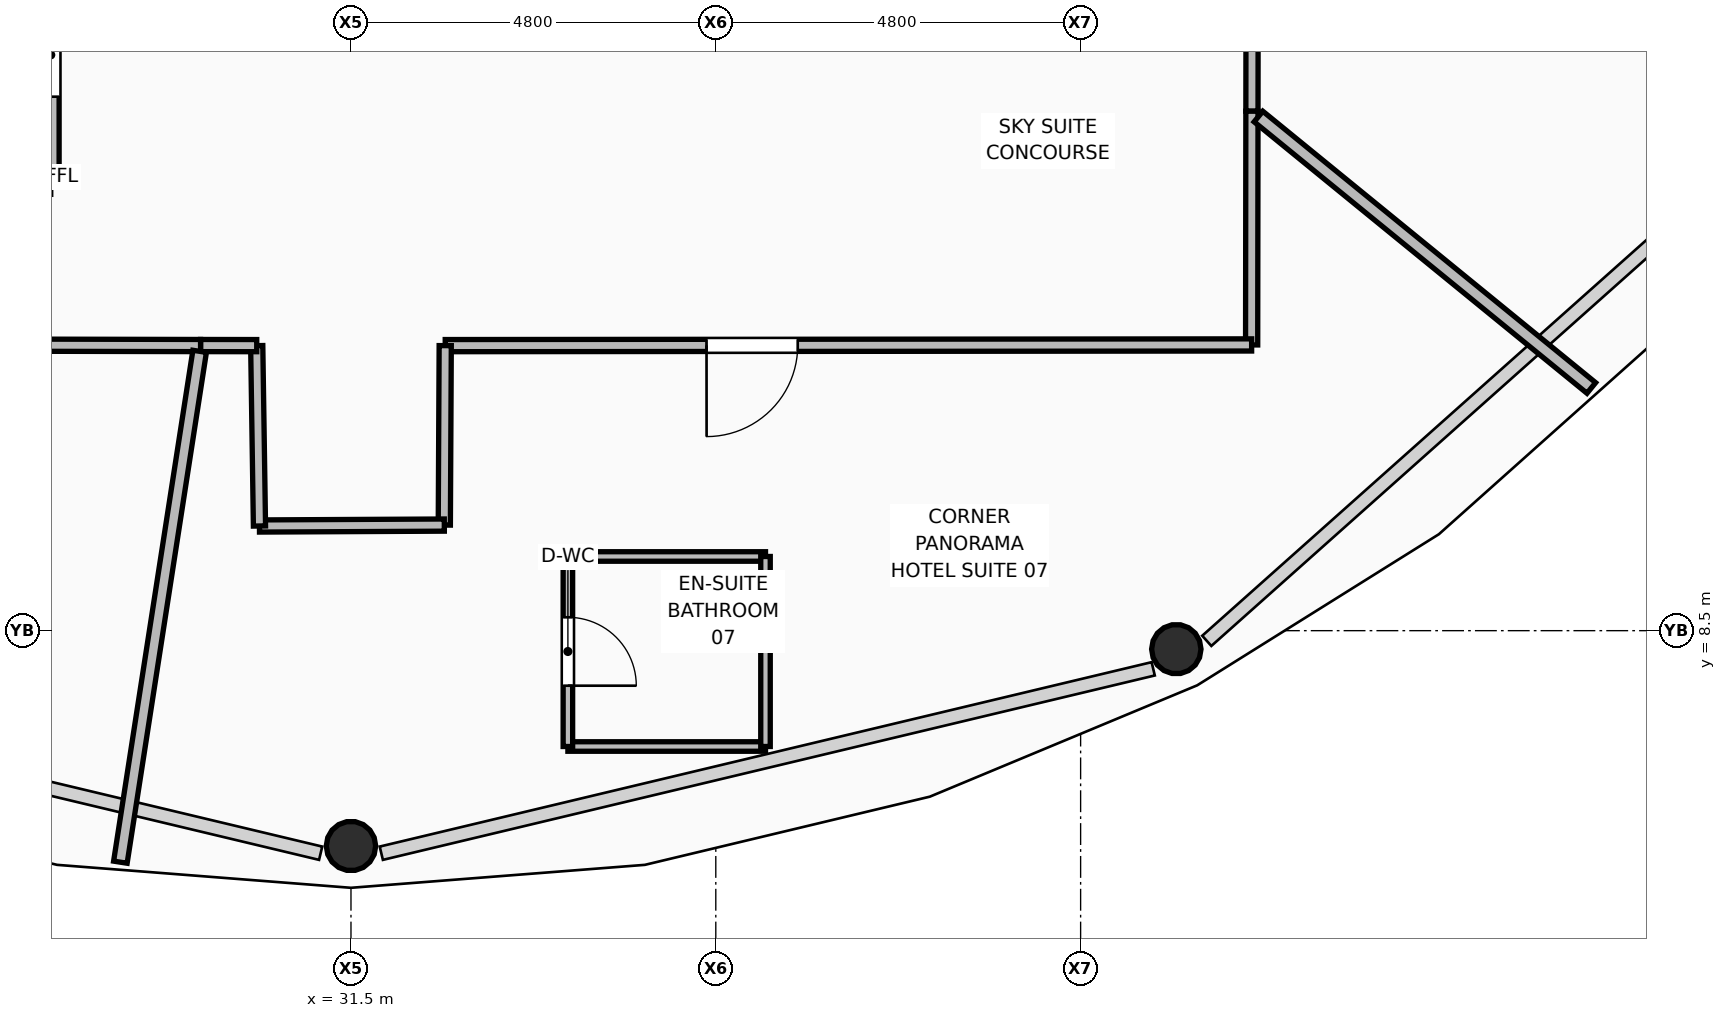
"""IFC4 building model, lengths in metres.
Left out: names, types, materials, properties, quantities, classifications, styles, units other than length and angle.
Written with IfcOpenShell. Run it as: python <this file> out.ifc"""

import sys

from ifc_helpers import new_model, si_unit, direction, frame, frame_2d, origin, origin_2d, place, context, subcontext, project, spatial, rectangle, hollow_circle, extrude, element, fill, save


model = new_model("IFC4")
c1 = context("Model", 3, precision=1e-05, world=origin(), true_north=direction((0.0, 1.0)))
c2 = subcontext(c1, "Body", "Model", "MODEL_VIEW")
j1 = project(units=[si_unit("LENGTHUNIT", "METRE"), si_unit("PLANEANGLEUNIT", "RADIAN")], contexts=[c1])
p1 = place(None, origin())
s1 = spatial("IfcSite", under=j1, at=p1, CompositionType="ELEMENT")
p2 = place(p1, origin())
s2 = spatial("IfcBuilding", under=s1, at=p2, CompositionType="ELEMENT")
p3 = place(p2, frame((0.0, 0.0, 246.15)))
s3 = spatial("IfcBuildingStorey", under=s2, at=p3, CompositionType="ELEMENT", Elevation=246.15)
for number, where, z_axis, x_axis in (
    (1, (31.5, 5.667, 0.0), (0.0, 0.0, 1.0), (1.0, 0.0, 0.0)),
    (2, (42.359, 8.257, 0.0), (0.0, 0.0, 1.0), (1.0, 0.0, 0.0)),
):
    element("IfcColumn", number, at=place(p3, frame(where, z_axis=z_axis, x_axis=x_axis)), inside=s3, PredefinedType="COLUMN", context=c2, shape_type="SweptSolid", body=[
        extrude(hollow_circle(Radius=0.325, WallThickness=0.03, at=origin_2d()), origin(), (0.0, 0.0, 1.0), 3.57),
    ])
p4 = place(p3, frame((27.55, 14.35, 0.0), z_axis=(0.0, 0.0, 1.0), x_axis=(0.0, 1.0, 0.0)))
e3 = element("IfcWall", 3, at=p4, inside=s3, PredefinedType="PARTITIONING", context=c2, shape_type="SweptSolid", body=[
    extrude(rectangle(XDim=3.45, YDim=0.22, at=frame_2d((1.725, 0.0))), origin(), (0.0, 0.0, 1.0), 3.081),
])
p5 = place(p4, frame((1.175, 0.0, 0.0)))
e4 = element("IfcOpeningElement", 4, at=p5, cuts=e3, PredefinedType="OPENING", context=c2, shape_type="SweptSolid", body=[
    extrude(rectangle(XDim=1.1, YDim=2.1, at=frame_2d((0.55, 1.05))), frame((0.0, 0.12, 0.0), z_axis=(0.0, -1.0, 0.0), x_axis=(1.0, 0.0, 0.0)), (0.0, 0.0, 1.0), 0.24),
])
p6 = place(p3, frame((43.365, 23.56, 0.0), z_axis=(0.0, 0.0, 1.0), x_axis=(-0.001335548165, -0.999999108155, 0.0)))
e5 = element("IfcWall", 5, at=p6, inside=s3, PredefinedType="PARTITIONING", context=c2, shape_type="SweptSolid", body=[
    extrude(rectangle(XDim=8.226, YDim=0.16, at=frame_2d((4.113, 0.0))), origin(), (0.0, 0.0, 1.0), 3.081),
])
p7 = place(p6, frame((0.16, 0.0, 0.0)))
e6 = element("IfcOpeningElement", 6, at=p7, cuts=e5, PredefinedType="OPENING", context=c2, shape_type="SweptSolid", body=[
    extrude(rectangle(XDim=1.2, YDim=2.1, at=frame_2d((0.6, 1.05))), frame((0.0, 0.09, 0.0), z_axis=(0.0, -1.0, 0.0), x_axis=(1.0, 0.0, 0.0)), (0.0, 0.0, 1.0), 0.18),
])
p8 = place(p3, frame((43.354, 15.334, 0.0), z_axis=(0.0, 0.0, 1.0), x_axis=(-0.00127034435, -0.999999193112, 0.0)))
e7 = element("IfcWall", 7, at=p8, inside=s3, PredefinedType="PARTITIONING", context=c2, shape_type="SweptSolid", body=[
    extrude(rectangle(XDim=3.075, YDim=0.16, at=frame_2d((1.538, 0.0))), origin(), (0.0, 0.0, 1.0), 3.55),
])
p9 = place(p3, frame((43.35, 12.259, 0.0), z_axis=(0.0, 0.0, 1.0), x_axis=(-0.999999637579, -0.000851376852, 0.0)))
e8 = element("IfcWall", 8, at=p9, inside=s3, PredefinedType="PARTITIONING", context=c2, shape_type="SweptSolid", body=[
    extrude(rectangle(XDim=10.61, YDim=0.16, at=frame_2d((5.305, 0.0))), origin(), (0.0, 0.0, 1.0), 3.081),
])
p10 = place(p9, frame((5.972, 0.0, 0.0)))
e9 = element("IfcOpeningElement", 9, at=p10, cuts=e8, PredefinedType="OPENING", context=c2, shape_type="SweptSolid", body=[
    extrude(rectangle(XDim=1.2, YDim=2.1, at=frame_2d((0.6, 1.05))), frame((0.0, 0.09, 0.0), z_axis=(0.0, -1.0, 0.0), x_axis=(1.0, 0.0, 0.0)), (0.0, 0.0, 1.0), 0.18),
])
p11 = place(p3, frame((32.74, 12.25, 0.0), z_axis=(0.0, 0.0, 1.0), x_axis=(-0.005066629207, -0.999987164552, 0.0)))
e10 = element("IfcWall", 10, at=p11, inside=s3, PredefinedType="PARTITIONING", context=c2, shape_type="SweptSolid", body=[
    extrude(rectangle(XDim=2.361, YDim=0.16, at=frame_2d((1.181, 0.0))), origin(), (0.0, 0.0, 1.0), 3.55),
])
p12 = place(p3, frame((32.728, 9.889, 0.0), z_axis=(0.0, 0.0, 1.0), x_axis=(-0.999987903459, -0.004918631527, 0.0)))
e11 = element("IfcWall", 11, at=p12, inside=s3, PredefinedType="PARTITIONING", context=c2, shape_type="SweptSolid", body=[
    extrude(rectangle(XDim=2.432, YDim=0.16, at=frame_2d((1.216, 0.0))), origin(), (0.0, 0.0, 1.0), 3.081),
])
p13 = place(p3, frame((30.296, 9.877, 0.0), z_axis=(0.0, 0.0, 1.0), x_axis=(-0.015121727576, 0.999885660141, 0.0)))
e12 = element("IfcWall", 12, at=p13, inside=s3, PredefinedType="PARTITIONING", context=c2, shape_type="SweptSolid", body=[
    extrude(rectangle(XDim=2.373, YDim=0.16, at=frame_2d((1.187, 0.0))), origin(), (0.0, 0.0, 1.0), 3.55),
])
p14 = place(p3, frame((30.26, 12.25, 0.0), z_axis=(0.0, 0.0, 1.0), x_axis=(-0.999999126899, 0.001321439216, 0.0)))
e13 = element("IfcWall", 13, at=p14, inside=s3, PredefinedType="PARTITIONING", context=c2, shape_type="SweptSolid", body=[
    extrude(rectangle(XDim=0.739, YDim=0.16, at=frame_2d((0.37, 0.0))), origin(), (0.0, 0.0, 1.0), 3.55),
])
p15 = place(p3, frame((29.521, 12.251, 0.0), z_axis=(0.0, 0.0, 1.0), x_axis=(-0.999997801115, 0.002097084968, 0.0)))
e14 = element("IfcWall", 14, at=p15, inside=s3, PredefinedType="PARTITIONING", context=c2, shape_type="SweptSolid", body=[
    extrude(rectangle(XDim=8.615, YDim=0.16, at=frame_2d((4.308, 0.0))), origin(), (0.0, 0.0, 1.0), 3.081),
])
p16 = place(p15, frame((3.708, 0.0, 0.0)))
e15 = element("IfcOpeningElement", 15, at=p16, cuts=e14, PredefinedType="OPENING", context=c2, shape_type="SweptSolid", body=[
    extrude(rectangle(XDim=1.2, YDim=2.1, at=frame_2d((0.6, 1.05))), frame((0.0, 0.09, 0.0), z_axis=(0.0, -1.0, 0.0), x_axis=(1.0, 0.0, 0.0)), (0.0, 0.0, 1.0), 0.18),
])
p17 = place(p3, frame((29.509, 12.175, 0.0), z_axis=(0.0, 0.0, 1.0), x_axis=(-0.15334639492, -0.988172496665, 0.0)))
e16 = element("IfcWall", 16, at=p17, inside=s3, PredefinedType="PARTITIONING", context=c2, shape_type="SweptSolid", body=[
    extrude(rectangle(XDim=6.801, YDim=0.18, at=frame_2d((3.401, 0.0))), origin(), (0.0, 0.0, 1.0), 2.925),
])
p18 = place(p3, frame((43.44, 15.264, 0.0), z_axis=(0.0, 0.0, 1.0), x_axis=(0.77500924649, -0.631949893469, 0.0)))
e17 = element("IfcWall", 17, at=p18, inside=s3, PredefinedType="PARTITIONING", context=c2, shape_type="SweptSolid", body=[
    extrude(rectangle(XDim=5.65, YDim=0.18, at=frame_2d((2.825, 0.0))), origin(), (0.0, 0.0, 1.0), 2.925),
])
p19 = place(p3, frame((34.354, 6.976, 0.0), z_axis=(0.0, 0.0, 1.0), x_axis=(1.0, 0.0, 0.0)))
e18 = element("IfcWall", 18, at=p19, inside=s3, PredefinedType="PARTITIONING", context=c2, shape_type="SweptSolid", body=[
    extrude(rectangle(XDim=2.6, YDim=0.125, at=frame_2d((1.3, 0.0))), origin(), (0.0, 0.0, 1.0), 2.925),
])
p20 = place(p3, frame((34.354, 9.476, 0.0), z_axis=(0.0, 0.0, 1.0), x_axis=(1.0, 0.0, 0.0)))
e19 = element("IfcWall", 19, at=p20, inside=s3, PredefinedType="PARTITIONING", context=c2, shape_type="SweptSolid", body=[
    extrude(rectangle(XDim=2.6, YDim=0.125, at=frame_2d((1.3, 0.0))), origin(), (0.0, 0.0, 1.0), 3.55),
])
p21 = place(p3, frame((34.354, 6.976, 0.0), z_axis=(0.0, 0.0, 1.0), x_axis=(0.0, 1.0, 0.0)))
e20 = element("IfcWall", 20, at=p21, inside=s3, PredefinedType="PARTITIONING", context=c2, shape_type="SweptSolid", body=[
    extrude(rectangle(XDim=2.5, YDim=0.125, at=frame_2d((1.25, 0.0))), origin(), (0.0, 0.0, 1.0), 3.55),
])
p22 = place(p21, frame((0.8, 0.0, 0.0)))
e21 = element("IfcOpeningElement", 21, at=p22, cuts=e20, PredefinedType="OPENING", context=c2, shape_type="SweptSolid", body=[
    extrude(rectangle(XDim=0.9, YDim=2.1, at=frame_2d((0.45, 1.05))), frame((0.0, 0.073, 0.0), z_axis=(0.0, -1.0, 0.0), x_axis=(1.0, 0.0, 0.0)), (0.0, 0.0, 1.0), 0.145),
])
p23 = place(p3, frame((36.954, 6.976, 0.0), z_axis=(0.0, 0.0, 1.0), x_axis=(0.0, 1.0, 0.0)))
e22 = element("IfcWall", 22, at=p23, inside=s3, PredefinedType="PARTITIONING", context=c2, shape_type="SweptSolid", body=[
    extrude(rectangle(XDim=2.5, YDim=0.125, at=frame_2d((1.25, 0.0))), origin(), (0.0, 0.0, 1.0), 2.925),
])
p24 = place(p5, origin())
e23 = element("IfcDoor", 23, at=p24, inside=s3, OperationType="SINGLE_SWING_LEFT", PredefinedType="DOOR", context=c2, shape_type="SweptSolid", body=[
    extrude(rectangle(XDim=1.1, YDim=2.1, at=frame_2d((0.55, 1.05))), frame((0.0, 0.025, 0.0), z_axis=(0.0, -1.0, 0.0), x_axis=(1.0, 0.0, 0.0)), (0.0, 0.0, 1.0), 0.05),
])
fill(e4, e23)
p25 = place(p22, frame((0.9, 0.0, 0.0), z_axis=(0.0, 0.0, 1.0), x_axis=(-1.0, 0.0, 0.0)))
e24 = element("IfcDoor", 24, at=p25, inside=s3, OperationType="SINGLE_SWING_RIGHT", PredefinedType="DOOR", context=c2, shape_type="SweptSolid", body=[
    extrude(rectangle(XDim=0.9, YDim=2.1, at=frame_2d((0.45, 1.05))), frame((0.0, 0.025, 0.0), z_axis=(0.0, -1.0, 0.0), x_axis=(1.0, 0.0, 0.0)), (0.0, 0.0, 1.0), 0.05),
])
fill(e21, e24)
p26 = place(p10, origin())
e25 = element("IfcDoor", 25, at=p26, inside=s3, OperationType="SINGLE_SWING_RIGHT", PredefinedType="DOOR", context=c2, shape_type="SweptSolid", body=[
    extrude(rectangle(XDim=1.2, YDim=2.1, at=frame_2d((0.6, 1.05))), frame((0.0, 0.025, 0.0), z_axis=(0.0, -1.0, 0.0), x_axis=(1.0, 0.0, 0.0)), (0.0, 0.0, 1.0), 0.05),
])
fill(e9, e25)
save(model, sys.argv[1])
